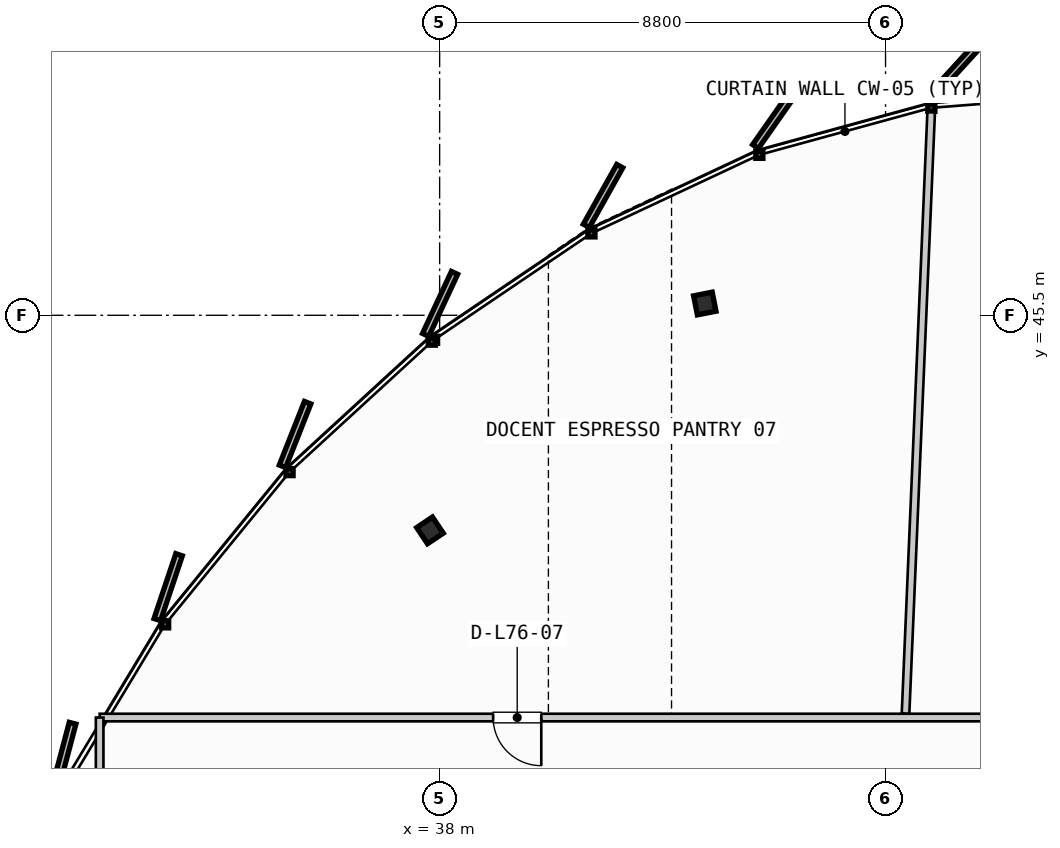
"""IFC4 building model, lengths in metres.
Left out: names, types, materials, properties, quantities, classifications, styles, units other than length and angle.
Written with IfcOpenShell. Run it as: python <this file> out.ifc"""

import sys

from ifc_helpers import new_model, si_unit, direction, frame, frame_2d, origin, origin_2d, place, context, subcontext, project, spatial, rectangle, i_section, extrude, source, transform, mapped, element, fill, save


model = new_model("IFC4")
c1 = context("Model", 3, precision=1e-05, world=origin(), true_north=direction((0.0, 1.0)))
c2 = subcontext(c1, "Body", "Model", "MODEL_VIEW")
j1 = project(units=[si_unit("LENGTHUNIT", "METRE"), si_unit("PLANEANGLEUNIT", "RADIAN")], contexts=[c1])
p1 = place(None, origin())
s1 = spatial("IfcSite", under=j1, at=p1, CompositionType="ELEMENT")
p2 = place(p1, origin())
s2 = spatial("IfcBuilding", under=s1, at=p2, CompositionType="ELEMENT")
p3 = place(p2, frame((0.0, 0.0, 287.05)))
s3 = spatial("IfcBuildingStorey", under=s2, at=p3, CompositionType="ELEMENT", Elevation=287.05)
m1 = source(origin(), c2, "Body", "SweptSolid", [
    extrude(i_section(OverallWidth=0.374, OverallDepth=0.383, WebThickness=0.017, FlangeThickness=0.026, FilletRadius=0.015, at=origin_2d()), origin(), (0.0, 0.0, 1.0), 3.21),
])
for number, where, z_axis, x_axis in (
    (1, (43.233, 45.732, 0.0), (0.0, 0.0, 1.0), (-0.195, 0.981, 0.0)),
    (2, (37.81, 41.255, 0.0), (0.0, 0.0, 1.0), (-0.556, 0.831, 0.0)),
):
    element("IfcColumn", number, at=place(p3, frame(where, z_axis=z_axis, x_axis=x_axis)), inside=s3, PredefinedType="COLUMN", context=c2, shape_type="MappedRepresentation", body=[
        mapped(m1, transform((0.0, 0.0, 0.0), scale=1.0)),
    ])
p4 = place(p3, frame((61.564, 37.562, 0.0), z_axis=(0.0, 0.0, 1.0), x_axis=(-1.0, 0.0, 0.0)))
e3 = element("IfcWall", 3, at=p4, inside=s3, PredefinedType="PARTITIONING", context=c2, shape_type="SweptSolid", body=[
    extrude(rectangle(XDim=30.274, YDim=0.15, at=frame_2d((15.137, 0.0))), origin(), (0.0, 0.0, 1.0), 2.315),
])
p5 = place(p4, frame((7.001, 0.0, 0.0)))
e4 = element("IfcOpeningElement", 4, at=p5, cuts=e3, PredefinedType="OPENING", context=c2, shape_type="SweptSolid", body=[
    extrude(rectangle(XDim=0.95, YDim=2.15, at=frame_2d((0.475, 1.075))), frame((0.0, 0.085, 0.0), z_axis=(0.0, -1.0, 0.0), x_axis=(1.0, 0.0, 0.0)), (0.0, 0.0, 1.0), 0.17),
])
p6 = place(p4, frame((21.558, 0.0, 0.0)))
e5 = element("IfcOpeningElement", 5, at=p6, cuts=e3, PredefinedType="OPENING", context=c2, shape_type="SweptSolid", body=[
    extrude(rectangle(XDim=0.95, YDim=2.15, at=frame_2d((0.475, 1.075))), frame((0.0, 0.085, 0.0), z_axis=(0.0, -1.0, 0.0), x_axis=(1.0, 0.0, 0.0)), (0.0, 0.0, 1.0), 0.17),
])
p7 = place(p3, frame((31.29, 37.562, 0.0), z_axis=(0.0, 0.0, 1.0), x_axis=(0.0, -1.0, 0.0)))
e6 = element("IfcWall", 6, at=p7, inside=s3, PredefinedType="PARTITIONING", context=c2, shape_type="SweptSolid", body=[
    extrude(rectangle(XDim=19.293, YDim=0.15, at=frame_2d((9.646, 0.0))), origin(), (0.0, 0.0, 1.0), 2.315),
])
p8 = place(p7, frame((14.298, 0.0, 0.0)))
e7 = element("IfcOpeningElement", 7, at=p8, cuts=e6, PredefinedType="OPENING", context=c2, shape_type="SweptSolid", body=[
    extrude(rectangle(XDim=0.95, YDim=2.15, at=frame_2d((0.475, 1.075))), frame((0.0, 0.085, 0.0), z_axis=(0.0, -1.0, 0.0), x_axis=(1.0, 0.0, 0.0)), (0.0, 0.0, 1.0), 0.17),
])
p9 = place(p3, frame((47.195, 37.642, 0.0), z_axis=(0.0, 0.0, 1.0), x_axis=(0.042599425982, 0.999092232432, 0.0)))
e8 = element("IfcWall", 8, at=p9, inside=s3, PredefinedType="PARTITIONING", context=c2, shape_type="SweptSolid", body=[
    extrude(rectangle(XDim=11.875, YDim=0.15, at=frame_2d((5.938, 0.0))), origin(), (0.0, 0.0, 1.0), 2.315),
])
m2 = source(origin(), c2, "Body", "SweptSolid", [
    extrude(rectangle(XDim=0.95, YDim=2.15, at=frame_2d((0.475, 1.075))), frame((0.0, 0.025, 0.0), z_axis=(0.0, -1.0, 0.0), x_axis=(1.0, 0.0, 0.0)), (0.0, 0.0, 1.0), 0.05),
])
p10 = place(p6, origin())
e9 = element("IfcDoor", 9, at=p10, inside=s3, OperationType="SINGLE_SWING_LEFT", PredefinedType="DOOR", context=c2, shape_type="MappedRepresentation", body=[
    mapped(m2, transform((0.0, 0.0, 0.0), scale=1.0)),
])
fill(e5, e9)
save(model, sys.argv[1])
